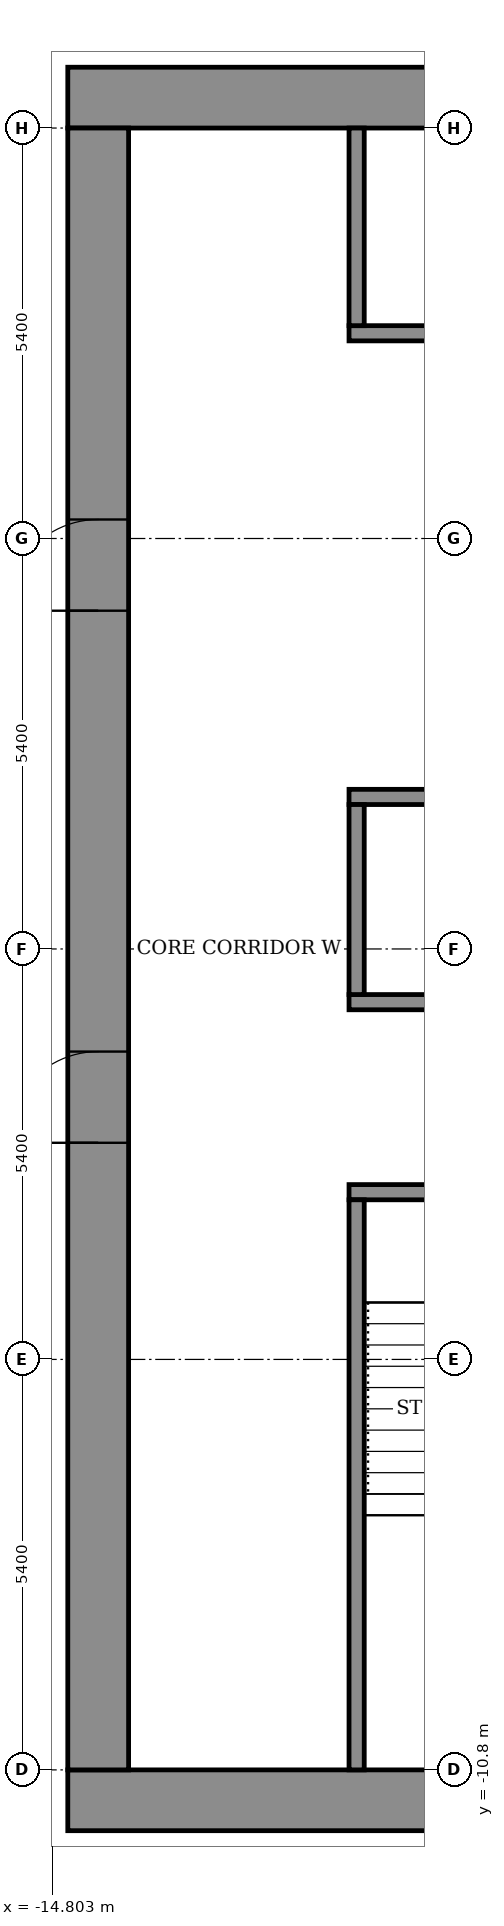
"""IFC4 building model, lengths in metres.
Left out: names, types, materials, properties, quantities, classifications, styles, units other than length and angle.
Written with IfcOpenShell. Run it as: python <this file> out.ifc"""

import sys

from ifc_helpers import new_model, si_unit, direction, frame, frame_2d, origin, place, context, subcontext, project, spatial, rectangle, extrude, element, fill, save


model = new_model("IFC4")
c1 = context("Model", 3, precision=1e-05, world=origin(), true_north=direction((0.0, 1.0)))
c2 = subcontext(c1, "Body", "Model", "MODEL_VIEW")
j1 = project(units=[si_unit("LENGTHUNIT", "METRE"), si_unit("PLANEANGLEUNIT", "RADIAN")], contexts=[c1])
p1 = place(None, origin())
s1 = spatial("IfcSite", under=j1, at=p1, CompositionType="ELEMENT")
p2 = place(p1, origin())
s2 = spatial("IfcBuilding", under=s1, at=p2, CompositionType="ELEMENT")
p3 = place(p2, frame((0.0, 0.0, 197.9)))
s3 = spatial("IfcBuildingStorey", under=s2, at=p3, CompositionType="ELEMENT", Elevation=197.9)
for number, where, z_axis, x_axis in (
    (1, (-14.6, -11.2, 0.0), (0.0, 0.0, 1.0), (1.0, 0.0, 0.0)),
    (2, (-14.6, 11.2, 0.0), (0.0, 0.0, 1.0), (1.0, 0.0, 0.0)),
):
    element("IfcWall", number, at=place(p3, frame(where, z_axis=z_axis, x_axis=x_axis)), inside=s3, PredefinedType="SHEAR", context=c2, shape_type="SweptSolid", body=[
        extrude(rectangle(XDim=29.2, YDim=0.8, at=frame_2d((14.6, 0.0))), origin(), (0.0, 0.0, 1.0), 3.6),
    ])
p4 = place(p3, frame((-14.2, -10.8, 0.0), z_axis=(0.0, 0.0, 1.0), x_axis=(0.0, 1.0, 0.0)))
e3 = element("IfcWall", 3, at=p4, inside=s3, PredefinedType="SHEAR", context=c2, shape_type="SweptSolid", body=[
    extrude(rectangle(XDim=21.6, YDim=0.8, at=frame_2d((10.8, 0.0))), origin(), (0.0, 0.0, 1.0), 3.6),
])
p5 = place(p4, frame((8.25, 0.0, 0.0)))
e4 = element("IfcOpeningElement", 4, at=p5, cuts=e3, PredefinedType="OPENING", context=c2, shape_type="SweptSolid", body=[
    extrude(rectangle(XDim=1.2, YDim=2.1, at=frame_2d((0.6, 1.05))), frame((0.0, 0.41, 0.0), z_axis=(0.0, -1.0, 0.0), x_axis=(1.0, 0.0, 0.0)), (0.0, 0.0, 1.0), 0.82),
])
p6 = place(p4, frame((15.25, 0.0, 0.0)))
e5 = element("IfcOpeningElement", 5, at=p6, cuts=e3, PredefinedType="OPENING", context=c2, shape_type="SweptSolid", body=[
    extrude(rectangle(XDim=1.2, YDim=2.1, at=frame_2d((0.6, 1.05))), frame((0.0, 0.41, 0.0), z_axis=(0.0, -1.0, 0.0), x_axis=(1.0, 0.0, 0.0)), (0.0, 0.0, 1.0), 0.82),
])
p7 = place(p3, frame((-10.9, -3.2, 0.0), z_axis=(0.0, 0.0, 1.0), x_axis=(1.0, 0.0, 0.0)))
e6 = element("IfcWall", 6, at=p7, inside=s3, PredefinedType="SHEAR", context=c2, shape_type="SweptSolid", body=[
    extrude(rectangle(XDim=21.8, YDim=0.2, at=frame_2d((10.9, 0.0))), origin(), (0.0, 0.0, 1.0), 3.05),
])
p8 = place(p7, frame((1.075, 0.0, 0.0)))
e7 = element("IfcOpeningElement", 7, at=p8, cuts=e6, PredefinedType="OPENING", context=c2, shape_type="SweptSolid", body=[
    extrude(rectangle(XDim=1.1, YDim=2.1, at=frame_2d((0.55, 1.05))), frame((0.0, 0.11, 0.0), z_axis=(0.0, -1.0, 0.0), x_axis=(1.0, 0.0, 0.0)), (0.0, 0.0, 1.0), 0.22),
])
p9 = place(p7, frame((10.325, 0.0, 0.0)))
e8 = element("IfcOpeningElement", 8, at=p9, cuts=e6, PredefinedType="OPENING", context=c2, shape_type="SweptSolid", body=[
    extrude(rectangle(XDim=1.1, YDim=2.1, at=frame_2d((0.55, 1.05))), frame((0.0, 0.11, 0.0), z_axis=(0.0, -1.0, 0.0), x_axis=(1.0, 0.0, 0.0)), (0.0, 0.0, 1.0), 0.22),
])
p10 = place(p7, frame((19.625, 0.0, 0.0)))
e9 = element("IfcOpeningElement", 9, at=p10, cuts=e6, PredefinedType="OPENING", context=c2, shape_type="SweptSolid", body=[
    extrude(rectangle(XDim=1.1, YDim=2.1, at=frame_2d((0.55, 1.05))), frame((0.0, 0.11, 0.0), z_axis=(0.0, -1.0, 0.0), x_axis=(1.0, 0.0, 0.0)), (0.0, 0.0, 1.0), 0.22),
])
p11 = place(p7, frame((5.7, 0.0, 0.0)))
e10 = element("IfcOpeningElement", 10, at=p11, cuts=e6, PredefinedType="OPENING", context=c2, shape_type="SweptSolid", body=[
    extrude(rectangle(XDim=1.1, YDim=2.1, at=frame_2d((0.55, 1.05))), frame((0.0, 0.11, 0.0), z_axis=(0.0, -1.0, 0.0), x_axis=(1.0, 0.0, 0.0)), (0.0, 0.0, 1.0), 0.22),
])
p12 = place(p7, frame((14.975, 0.0, 0.0)))
e11 = element("IfcOpeningElement", 11, at=p12, cuts=e6, PredefinedType="OPENING", context=c2, shape_type="SweptSolid", body=[
    extrude(rectangle(XDim=1.1, YDim=2.1, at=frame_2d((0.55, 1.05))), frame((0.0, 0.11, 0.0), z_axis=(0.0, -1.0, 0.0), x_axis=(1.0, 0.0, 0.0)), (0.0, 0.0, 1.0), 0.22),
])
p13 = place(p3, frame((-10.9, -0.7, 0.0), z_axis=(0.0, 0.0, 1.0), x_axis=(1.0, 0.0, 0.0)))
e12 = element("IfcWall", 12, at=p13, inside=s3, PredefinedType="SHEAR", context=c2, shape_type="SweptSolid", body=[
    extrude(rectangle(XDim=21.8, YDim=0.2, at=frame_2d((10.9, 0.0))), origin(), (0.0, 0.0, 1.0), 3.05),
])
p14 = place(p3, frame((-10.9, 2.0, 0.0), z_axis=(0.0, 0.0, 1.0), x_axis=(1.0, 0.0, 0.0)))
e13 = element("IfcWall", 13, at=p14, inside=s3, PredefinedType="SHEAR", context=c2, shape_type="SweptSolid", body=[
    extrude(rectangle(XDim=21.8, YDim=0.2, at=frame_2d((10.9, 0.0))), origin(), (0.0, 0.0, 1.0), 3.05),
])
p15 = place(p14, frame((14.4, 0.0, 0.0)))
e14 = element("IfcOpeningElement", 14, at=p15, cuts=e13, PredefinedType="OPENING", context=c2, shape_type="SweptSolid", body=[
    extrude(rectangle(XDim=1.1, YDim=2.1, at=frame_2d((0.55, 1.05))), frame((0.0, 0.11, 0.0), z_axis=(0.0, -1.0, 0.0), x_axis=(1.0, 0.0, 0.0)), (0.0, 0.0, 1.0), 0.22),
])
p16 = place(p14, frame((17.1, 0.0, 0.0)))
e15 = element("IfcOpeningElement", 15, at=p16, cuts=e13, PredefinedType="OPENING", context=c2, shape_type="SweptSolid", body=[
    extrude(rectangle(XDim=1.1, YDim=2.1, at=frame_2d((0.55, 1.05))), frame((0.0, 0.11, 0.0), z_axis=(0.0, -1.0, 0.0), x_axis=(1.0, 0.0, 0.0)), (0.0, 0.0, 1.0), 0.22),
])
p17 = place(p14, frame((19.8, 0.0, 0.0)))
e16 = element("IfcOpeningElement", 16, at=p17, cuts=e13, PredefinedType="OPENING", context=c2, shape_type="SweptSolid", body=[
    extrude(rectangle(XDim=1.1, YDim=2.1, at=frame_2d((0.55, 1.05))), frame((0.0, 0.11, 0.0), z_axis=(0.0, -1.0, 0.0), x_axis=(1.0, 0.0, 0.0)), (0.0, 0.0, 1.0), 0.22),
])
p18 = place(p14, frame((1.675, 0.0, 0.0)))
e17 = element("IfcOpeningElement", 17, at=p18, cuts=e13, PredefinedType="OPENING", context=c2, shape_type="SweptSolid", body=[
    extrude(rectangle(XDim=0.9, YDim=2.1, at=frame_2d((0.45, 1.05))), frame((0.0, 0.11, 0.0), z_axis=(0.0, -1.0, 0.0), x_axis=(1.0, 0.0, 0.0)), (0.0, 0.0, 1.0), 0.22),
])
p19 = place(p14, frame((8.425, 0.0, 0.0)))
e18 = element("IfcOpeningElement", 18, at=p19, cuts=e13, PredefinedType="OPENING", context=c2, shape_type="SweptSolid", body=[
    extrude(rectangle(XDim=0.9, YDim=2.1, at=frame_2d((0.45, 1.05))), frame((0.0, 0.11, 0.0), z_axis=(0.0, -1.0, 0.0), x_axis=(1.0, 0.0, 0.0)), (0.0, 0.0, 1.0), 0.22),
])
p20 = place(p3, frame((-10.9, 8.1, 0.0), z_axis=(0.0, 0.0, 1.0), x_axis=(1.0, 0.0, 0.0)))
e19 = element("IfcWall", 19, at=p20, inside=s3, PredefinedType="SHEAR", context=c2, shape_type="SweptSolid", body=[
    extrude(rectangle(XDim=21.8, YDim=0.2, at=frame_2d((10.9, 0.0))), origin(), (0.0, 0.0, 1.0), 3.05),
])
p21 = place(p20, frame((14.4, 0.0, 0.0)))
e20 = element("IfcOpeningElement", 20, at=p21, cuts=e19, PredefinedType="OPENING", context=c2, shape_type="SweptSolid", body=[
    extrude(rectangle(XDim=1.1, YDim=2.1, at=frame_2d((0.55, 1.05))), frame((0.0, 0.11, 0.0), z_axis=(0.0, -1.0, 0.0), x_axis=(1.0, 0.0, 0.0)), (0.0, 0.0, 1.0), 0.22),
])
p22 = place(p20, frame((17.1, 0.0, 0.0)))
e21 = element("IfcOpeningElement", 21, at=p22, cuts=e19, PredefinedType="OPENING", context=c2, shape_type="SweptSolid", body=[
    extrude(rectangle(XDim=1.1, YDim=2.1, at=frame_2d((0.55, 1.05))), frame((0.0, 0.11, 0.0), z_axis=(0.0, -1.0, 0.0), x_axis=(1.0, 0.0, 0.0)), (0.0, 0.0, 1.0), 0.22),
])
p23 = place(p20, frame((19.8, 0.0, 0.0)))
e22 = element("IfcOpeningElement", 22, at=p23, cuts=e19, PredefinedType="OPENING", context=c2, shape_type="SweptSolid", body=[
    extrude(rectangle(XDim=1.1, YDim=2.1, at=frame_2d((0.55, 1.05))), frame((0.0, 0.11, 0.0), z_axis=(0.0, -1.0, 0.0), x_axis=(1.0, 0.0, 0.0)), (0.0, 0.0, 1.0), 0.22),
])
p24 = place(p20, frame((1.675, 0.0, 0.0)))
e23 = element("IfcOpeningElement", 23, at=p24, cuts=e19, PredefinedType="OPENING", context=c2, shape_type="SweptSolid", body=[
    extrude(rectangle(XDim=0.9, YDim=2.1, at=frame_2d((0.45, 1.05))), frame((0.0, 0.11, 0.0), z_axis=(0.0, -1.0, 0.0), x_axis=(1.0, 0.0, 0.0)), (0.0, 0.0, 1.0), 0.22),
])
p25 = place(p20, frame((8.425, 0.0, 0.0)))
e24 = element("IfcOpeningElement", 24, at=p25, cuts=e19, PredefinedType="OPENING", context=c2, shape_type="SweptSolid", body=[
    extrude(rectangle(XDim=0.9, YDim=2.1, at=frame_2d((0.45, 1.05))), frame((0.0, 0.11, 0.0), z_axis=(0.0, -1.0, 0.0), x_axis=(1.0, 0.0, 0.0)), (0.0, 0.0, 1.0), 0.22),
])
p26 = place(p3, frame((-10.8, -10.8, 0.0), z_axis=(0.0, 0.0, 1.0), x_axis=(0.0, 1.0, 0.0)))
e25 = element("IfcWall", 25, at=p26, inside=s3, PredefinedType="SHEAR", context=c2, shape_type="SweptSolid", body=[
    extrude(rectangle(XDim=7.5, YDim=0.2, at=frame_2d((3.75, 0.0))), origin(), (0.0, 0.0, 1.0), 3.05),
])
p27 = place(p3, frame((-10.8, -0.6, 0.0), z_axis=(0.0, 0.0, 1.0), x_axis=(0.0, 1.0, 0.0)))
e26 = element("IfcWall", 26, at=p27, inside=s3, PredefinedType="STANDARD", context=c2, shape_type="SweptSolid", body=[
    extrude(rectangle(XDim=2.5, YDim=0.2, at=frame_2d((1.25, 0.0))), origin(), (0.0, 0.0, 1.0), 3.05),
])
p28 = place(p3, frame((-10.8, 8.2, 0.0), z_axis=(0.0, 0.0, 1.0), x_axis=(0.0, 1.0, 0.0)))
e27 = element("IfcWall", 27, at=p28, inside=s3, PredefinedType="STANDARD", context=c2, shape_type="SweptSolid", body=[
    extrude(rectangle(XDim=2.6, YDim=0.2, at=frame_2d((1.3, 0.0))), origin(), (0.0, 0.0, 1.0), 3.05),
])
p29 = place(p5, origin())
e28 = element("IfcDoor", 28, at=p29, inside=s3, OperationType="DOUBLE_DOOR_SINGLE_SWING", PredefinedType="DOOR", context=c2, shape_type="SweptSolid", body=[
    extrude(rectangle(XDim=1.2, YDim=2.1, at=frame_2d((0.6, 1.05))), frame((0.0, 0.025, 0.0), z_axis=(0.0, -1.0, 0.0), x_axis=(1.0, 0.0, 0.0)), (0.0, 0.0, 1.0), 0.05),
])
fill(e4, e28)
p30 = place(p6, origin())
e29 = element("IfcDoor", 29, at=p30, inside=s3, OperationType="DOUBLE_DOOR_SINGLE_SWING", PredefinedType="DOOR", context=c2, shape_type="SweptSolid", body=[
    extrude(rectangle(XDim=1.2, YDim=2.1, at=frame_2d((0.6, 1.05))), frame((0.0, 0.025, 0.0), z_axis=(0.0, -1.0, 0.0), x_axis=(1.0, 0.0, 0.0)), (0.0, 0.0, 1.0), 0.05),
])
fill(e5, e29)
save(model, sys.argv[1])
